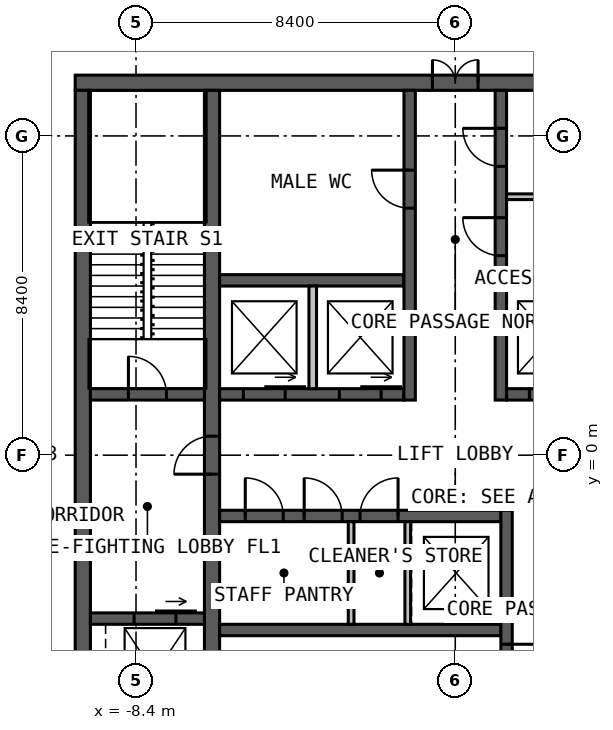
"""IFC4 building model, lengths in metres.
Left out: names, types, materials, properties, quantities, classifications, styles, units other than length and angle.
Written with IfcOpenShell. Run it as: python <this file> out.ifc"""

import sys

from ifc_helpers import new_model, si_unit, direction, frame, frame_2d, origin, place, context, subcontext, project, spatial, rectangle, extrude, element, fill, save


model = new_model("IFC4")
c1 = context("Model", 3, precision=1e-05, world=origin(), true_north=direction((0.0, 1.0)))
c2 = subcontext(c1, "Body", "Model", "MODEL_VIEW")
j1 = project(units=[si_unit("LENGTHUNIT", "METRE"), si_unit("PLANEANGLEUNIT", "RADIAN")], contexts=[c1])
p1 = place(None, origin())
s1 = spatial("IfcSite", under=j1, at=p1, CompositionType="ELEMENT")
p2 = place(p1, origin())
s2 = spatial("IfcBuilding", under=s1, at=p2, CompositionType="ELEMENT")
p3 = place(p2, frame((0.0, 0.0, 236.0)))
s3 = spatial("IfcBuildingStorey", under=s2, at=p3, CompositionType="ELEMENT", Elevation=236.0)
p4 = place(p3, frame((-10.0, 9.8, 0.0), z_axis=(0.0, 0.0, 1.0), x_axis=(1.0, 0.0, 0.0)))
e1 = element("IfcWall", 1, at=p4, inside=s3, PredefinedType="SOLIDWALL", context=c2, shape_type="SweptSolid", body=[
    extrude(rectangle(XDim=20.0, YDim=0.4, at=frame_2d((10.0, 0.0))), origin(), (0.0, 0.0, 1.0), 4.0),
])
p5 = place(p4, frame((9.4, 0.0, 0.0)))
e2 = element("IfcOpeningElement", 2, at=p5, cuts=e1, PredefinedType="OPENING", context=c2, shape_type="SweptSolid", body=[
    extrude(rectangle(XDim=1.2, YDim=2.2, at=frame_2d((0.6, 1.1))), frame((0.0, 0.21, 0.0), z_axis=(0.0, -1.0, 0.0), x_axis=(1.0, 0.0, 0.0)), (0.0, 0.0, 1.0), 0.42),
])
p6 = place(p3, frame((-9.8, 9.6, 0.0), z_axis=(0.0, 0.0, 1.0), x_axis=(0.0, -1.0, 0.0)))
e3 = element("IfcWall", 3, at=p6, inside=s3, PredefinedType="SOLIDWALL", context=c2, shape_type="SweptSolid", body=[
    extrude(rectangle(XDim=19.2, YDim=0.4, at=frame_2d((9.6, 0.0))), origin(), (0.0, 0.0, 1.0), 4.0),
])
p7 = place(p3, frame((-6.4, -9.6, 0.0), z_axis=(0.0, 0.0, 1.0), x_axis=(0.0, 1.0, 0.0)))
e4 = element("IfcWall", 4, at=p7, inside=s3, PredefinedType="SOLIDWALL", context=c2, shape_type="SweptSolid", body=[
    extrude(rectangle(XDim=19.2, YDim=0.4, at=frame_2d((9.6, 0.0))), origin(), (0.0, 0.0, 1.0), 4.0),
])
p8 = place(p7, frame((9.1, 0.0, 0.0)))
e5 = element("IfcOpeningElement", 5, at=p8, cuts=e4, PredefinedType="OPENING", context=c2, shape_type="SweptSolid", body=[
    extrude(rectangle(XDim=1.0, YDim=2.2, at=frame_2d((0.5, 1.1))), frame((0.0, 0.21, 0.0), z_axis=(0.0, -1.0, 0.0), x_axis=(1.0, 0.0, 0.0)), (0.0, 0.0, 1.0), 0.42),
])
p9 = place(p3, frame((-6.2, 1.6, 0.0), z_axis=(0.0, 0.0, 1.0), x_axis=(1.0, 0.0, 0.0)))
e6 = element("IfcWall", 6, at=p9, inside=s3, PredefinedType="SOLIDWALL", context=c2, shape_type="SweptSolid", body=[
    extrude(rectangle(XDim=4.85, YDim=0.3, at=frame_2d((2.425, 0.0))), origin(), (0.0, 0.0, 1.0), 4.0),
])
p10 = place(p9, frame((0.625, 0.0, 0.0)))
e7 = element("IfcOpeningElement", 7, at=p10, cuts=e6, PredefinedType="OPENING", context=c2, shape_type="SweptSolid", body=[
    extrude(rectangle(XDim=1.1, YDim=2.2, at=frame_2d((0.55, 1.1))), frame((0.0, 0.16, 0.0), z_axis=(0.0, -1.0, 0.0), x_axis=(1.0, 0.0, 0.0)), (0.0, 0.0, 1.0), 0.32),
])
p11 = place(p9, frame((3.15, 0.0, 0.0)))
e8 = element("IfcOpeningElement", 8, at=p11, cuts=e6, PredefinedType="OPENING", context=c2, shape_type="SweptSolid", body=[
    extrude(rectangle(XDim=1.1, YDim=2.2, at=frame_2d((0.55, 1.1))), frame((0.0, 0.16, 0.0), z_axis=(0.0, -1.0, 0.0), x_axis=(1.0, 0.0, 0.0)), (0.0, 0.0, 1.0), 0.32),
])
p12 = place(p3, frame((1.35, 1.6, 0.0), z_axis=(0.0, 0.0, 1.0), x_axis=(1.0, 0.0, 0.0)))
e9 = element("IfcWall", 9, at=p12, inside=s3, PredefinedType="SOLIDWALL", context=c2, shape_type="SweptSolid", body=[
    extrude(rectangle(XDim=4.85, YDim=0.3, at=frame_2d((2.425, 0.0))), origin(), (0.0, 0.0, 1.0), 4.0),
])
p13 = place(p12, frame((0.6, 0.0, 0.0)))
e10 = element("IfcOpeningElement", 10, at=p13, cuts=e9, PredefinedType="OPENING", context=c2, shape_type="SweptSolid", body=[
    extrude(rectangle(XDim=1.1, YDim=2.2, at=frame_2d((0.55, 1.1))), frame((0.0, 0.16, 0.0), z_axis=(0.0, -1.0, 0.0), x_axis=(1.0, 0.0, 0.0)), (0.0, 0.0, 1.0), 0.32),
])
p14 = place(p12, frame((3.125, 0.0, 0.0)))
e11 = element("IfcOpeningElement", 11, at=p14, cuts=e9, PredefinedType="OPENING", context=c2, shape_type="SweptSolid", body=[
    extrude(rectangle(XDim=1.1, YDim=2.2, at=frame_2d((0.55, 1.1))), frame((0.0, 0.16, 0.0), z_axis=(0.0, -1.0, 0.0), x_axis=(1.0, 0.0, 0.0)), (0.0, 0.0, 1.0), 0.32),
])
for number, where, z_axis, x_axis in (
    (12, (-6.2, 4.6, 0.0), (0.0, 0.0, 1.0), (1.0, 0.0, 0.0)),
    (13, (1.35, 4.6, 0.0), (0.0, 0.0, 1.0), (1.0, 0.0, 0.0)),
):
    element("IfcWall", number, at=place(p3, frame(where, z_axis=z_axis, x_axis=x_axis)), inside=s3, PredefinedType="SOLIDWALL", context=c2, shape_type="SweptSolid", body=[
        extrude(rectangle(XDim=4.85, YDim=0.3, at=frame_2d((2.425, 0.0))), origin(), (0.0, 0.0, 1.0), 4.0),
    ])
p15 = place(p3, frame((-1.2, 1.45, 0.0), z_axis=(0.0, 0.0, 1.0), x_axis=(0.0, 1.0, 0.0)))
e14 = element("IfcWall", 14, at=p15, inside=s3, PredefinedType="SOLIDWALL", context=c2, shape_type="SweptSolid", body=[
    extrude(rectangle(XDim=8.15, YDim=0.3, at=frame_2d((4.075, 0.0))), origin(), (0.0, 0.0, 1.0), 4.0),
])
p16 = place(p15, frame((5.05, 0.0, 0.0)))
e15 = element("IfcOpeningElement", 15, at=p16, cuts=e14, PredefinedType="OPENING", context=c2, shape_type="SweptSolid", body=[
    extrude(rectangle(XDim=1.0, YDim=2.2, at=frame_2d((0.5, 1.1))), frame((0.0, 0.16, 0.0), z_axis=(0.0, -1.0, 0.0), x_axis=(1.0, 0.0, 0.0)), (0.0, 0.0, 1.0), 0.32),
])
p17 = place(p3, frame((1.2, 1.45, 0.0), z_axis=(0.0, 0.0, 1.0), x_axis=(0.0, 1.0, 0.0)))
e16 = element("IfcWall", 16, at=p17, inside=s3, PredefinedType="SOLIDWALL", context=c2, shape_type="SweptSolid", body=[
    extrude(rectangle(XDim=8.15, YDim=0.3, at=frame_2d((4.075, 0.0))), origin(), (0.0, 0.0, 1.0), 4.0),
])
p18 = place(p17, frame((3.8, 0.0, 0.0)))
e17 = element("IfcOpeningElement", 17, at=p18, cuts=e16, PredefinedType="OPENING", context=c2, shape_type="SweptSolid", body=[
    extrude(rectangle(XDim=1.0, YDim=2.2, at=frame_2d((0.5, 1.1))), frame((0.0, 0.16, 0.0), z_axis=(0.0, -1.0, 0.0), x_axis=(1.0, 0.0, 0.0)), (0.0, 0.0, 1.0), 0.32),
])
p19 = place(p17, frame((6.15, 0.0, 0.0)))
e18 = element("IfcOpeningElement", 18, at=p19, cuts=e16, PredefinedType="OPENING", context=c2, shape_type="SweptSolid", body=[
    extrude(rectangle(XDim=1.0, YDim=2.2, at=frame_2d((0.5, 1.1))), frame((0.0, 0.16, 0.0), z_axis=(0.0, -1.0, 0.0), x_axis=(1.0, 0.0, 0.0)), (0.0, 0.0, 1.0), 0.32),
])
p20 = place(p3, frame((-6.2, -1.6, 0.0), z_axis=(0.0, 0.0, 1.0), x_axis=(1.0, 0.0, 0.0)))
e19 = element("IfcWall", 19, at=p20, inside=s3, PredefinedType="SOLIDWALL", context=c2, shape_type="SweptSolid", body=[
    extrude(rectangle(XDim=7.4, YDim=0.3, at=frame_2d((3.7, 0.0))), origin(), (0.0, 0.0, 1.0), 4.0),
])
p21 = place(p20, frame((0.675, 0.0, 0.0)))
e20 = element("IfcOpeningElement", 20, at=p21, cuts=e19, PredefinedType="OPENING", context=c2, shape_type="SweptSolid", body=[
    extrude(rectangle(XDim=1.0, YDim=2.2, at=frame_2d((0.5, 1.1))), frame((0.0, 0.16, 0.0), z_axis=(0.0, -1.0, 0.0), x_axis=(1.0, 0.0, 0.0)), (0.0, 0.0, 1.0), 0.32),
])
p22 = place(p20, frame((2.225, 0.0, 0.0)))
e21 = element("IfcOpeningElement", 21, at=p22, cuts=e19, PredefinedType="OPENING", context=c2, shape_type="SweptSolid", body=[
    extrude(rectangle(XDim=1.0, YDim=2.2, at=frame_2d((0.5, 1.1))), frame((0.0, 0.16, 0.0), z_axis=(0.0, -1.0, 0.0), x_axis=(1.0, 0.0, 0.0)), (0.0, 0.0, 1.0), 0.32),
])
p23 = place(p20, frame((3.695, 0.0, 0.0)))
e22 = element("IfcOpeningElement", 22, at=p23, cuts=e19, PredefinedType="OPENING", context=c2, shape_type="SweptSolid", body=[
    extrude(rectangle(XDim=1.0, YDim=2.2, at=frame_2d((0.5, 1.1))), frame((0.0, 0.16, 0.0), z_axis=(0.0, -1.0, 0.0), x_axis=(1.0, 0.0, 0.0)), (0.0, 0.0, 1.0), 0.32),
])
p24 = place(p3, frame((-6.2, -4.6, 0.0), z_axis=(0.0, 0.0, 1.0), x_axis=(1.0, 0.0, 0.0)))
e23 = element("IfcWall", 23, at=p24, inside=s3, PredefinedType="SOLIDWALL", context=c2, shape_type="SweptSolid", body=[
    extrude(rectangle(XDim=7.4, YDim=0.3, at=frame_2d((3.7, 0.0))), origin(), (0.0, 0.0, 1.0), 4.0),
])
p25 = place(p3, frame((1.35, -1.45, 0.0), z_axis=(0.0, 0.0, 1.0), x_axis=(0.0, -1.0, 0.0)))
e24 = element("IfcWall", 24, at=p25, inside=s3, PredefinedType="SOLIDWALL", context=c2, shape_type="SweptSolid", body=[
    extrude(rectangle(XDim=8.15, YDim=0.3, at=frame_2d((4.075, 0.0))), origin(), (0.0, 0.0, 1.0), 4.0),
])
p26 = place(p25, frame((6.0, 0.0, 0.0)))
e25 = element("IfcOpeningElement", 25, at=p26, cuts=e24, PredefinedType="OPENING", context=c2, shape_type="SweptSolid", body=[
    extrude(rectangle(XDim=1.0, YDim=2.2, at=frame_2d((0.5, 1.1))), frame((0.0, 0.16, 0.0), z_axis=(0.0, -1.0, 0.0), x_axis=(1.0, 0.0, 0.0)), (0.0, 0.0, 1.0), 0.32),
])
p27 = place(p25, frame((3.525, 0.0, 0.0)))
e26 = element("IfcOpeningElement", 26, at=p27, cuts=e24, PredefinedType="OPENING", context=c2, shape_type="SweptSolid", body=[
    extrude(rectangle(XDim=0.9, YDim=2.2, at=frame_2d((0.45, 1.1))), frame((0.0, 0.16, 0.0), z_axis=(0.0, -1.0, 0.0), x_axis=(1.0, 0.0, 0.0)), (0.0, 0.0, 1.0), 0.32),
])
p28 = place(p3, frame((-9.6, 1.6, 0.0), z_axis=(0.0, 0.0, 1.0), x_axis=(1.0, 0.0, 0.0)))
e27 = element("IfcWall", 27, at=p28, inside=s3, PredefinedType="SOLIDWALL", context=c2, shape_type="SweptSolid", body=[
    extrude(rectangle(XDim=3.0, YDim=0.3, at=frame_2d((1.5, 0.0))), origin(), (0.0, 0.0, 1.0), 4.0),
])
p29 = place(p28, frame((1.0, 0.0, 0.0)))
e28 = element("IfcOpeningElement", 28, at=p29, cuts=e27, PredefinedType="OPENING", context=c2, shape_type="SweptSolid", body=[
    extrude(rectangle(XDim=1.0, YDim=2.2, at=frame_2d((0.5, 1.1))), frame((0.0, 0.16, 0.0), z_axis=(0.0, -1.0, 0.0), x_axis=(1.0, 0.0, 0.0)), (0.0, 0.0, 1.0), 0.32),
])
p30 = place(p3, frame((-9.6, -4.3, 0.0), z_axis=(0.0, 0.0, 1.0), x_axis=(1.0, 0.0, 0.0)))
e29 = element("IfcWall", 29, at=p30, inside=s3, PredefinedType="SOLIDWALL", context=c2, shape_type="SweptSolid", body=[
    extrude(rectangle(XDim=3.0, YDim=0.3, at=frame_2d((1.5, 0.0))), origin(), (0.0, 0.0, 1.0), 4.0),
])
p31 = place(p30, frame((1.15, 0.0, 0.0)))
e30 = element("IfcOpeningElement", 30, at=p31, cuts=e29, PredefinedType="OPENING", context=c2, shape_type="SweptSolid", body=[
    extrude(rectangle(XDim=1.1, YDim=2.2, at=frame_2d((0.55, 1.1))), frame((0.0, 0.16, 0.0), z_axis=(0.0, -1.0, 0.0), x_axis=(1.0, 0.0, 0.0)), (0.0, 0.0, 1.0), 0.32),
])
p32 = place(p3, frame((-3.75, 1.75, 0.0), z_axis=(0.0, 0.0, 1.0), x_axis=(0.0, 1.0, 0.0)))
e31 = element("IfcWall", 31, at=p32, inside=s3, PredefinedType="SOLIDWALL", context=c2, shape_type="SweptSolid", body=[
    extrude(rectangle(XDim=2.7, YDim=0.2, at=frame_2d((1.35, 0.0))), origin(), (0.0, 0.0, 1.0), 3.75),
])
p33 = place(p3, frame((1.35, 6.8, 0.0), z_axis=(0.0, 0.0, 1.0), x_axis=(1.0, 0.0, 0.0)))
e32 = element("IfcWall", 32, at=p33, inside=s3, PredefinedType="PARTITIONING", context=c2, shape_type="SweptSolid", body=[
    extrude(rectangle(XDim=4.85, YDim=0.15, at=frame_2d((2.425, 0.0))), origin(), (0.0, 0.0, 1.0), 3.75),
])
p34 = place(p33, frame((3.15, 0.0, 0.0)))
e33 = element("IfcOpeningElement", 33, at=p34, cuts=e32, PredefinedType="OPENING", context=c2, shape_type="SweptSolid", body=[
    extrude(rectangle(XDim=0.9, YDim=2.2, at=frame_2d((0.45, 1.1))), frame((0.0, 0.085, 0.0), z_axis=(0.0, -1.0, 0.0), x_axis=(1.0, 0.0, 0.0)), (0.0, 0.0, 1.0), 0.17),
])
for number, where, z_axis, x_axis in (
    (34, (-2.74, -1.75, 0.0), (0.0, 0.0, 1.0), (0.0, -1.0, 0.0)),
    (35, (-1.25, -1.75, 0.0), (0.0, 0.0, 1.0), (0.0, -1.0, 0.0)),
):
    element("IfcWall", number, at=place(p3, frame(where, z_axis=z_axis, x_axis=x_axis)), inside=s3, PredefinedType="PARTITIONING", context=c2, shape_type="SweptSolid", body=[
        extrude(rectangle(XDim=2.7, YDim=0.15, at=frame_2d((1.35, 0.0))), origin(), (0.0, 0.0, 1.0), 3.75),
    ])
p35 = place(p5, origin())
e36 = element("IfcDoor", 36, at=p35, inside=s3, OperationType="DOUBLE_DOOR_SINGLE_SWING", PredefinedType="DOOR", context=c2, shape_type="SweptSolid", body=[
    extrude(rectangle(XDim=1.2, YDim=2.2, at=frame_2d((0.6, 1.1))), frame((0.0, 0.025, 0.0), z_axis=(0.0, -1.0, 0.0), x_axis=(1.0, 0.0, 0.0)), (0.0, 0.0, 1.0), 0.05),
])
fill(e2, e36)
p36 = place(p8, origin())
e37 = element("IfcDoor", 37, at=p36, inside=s3, OperationType="SINGLE_SWING_LEFT", PredefinedType="DOOR", context=c2, shape_type="SweptSolid", body=[
    extrude(rectangle(XDim=1.0, YDim=2.2, at=frame_2d((0.5, 1.1))), frame((0.0, 0.025, 0.0), z_axis=(0.0, -1.0, 0.0), x_axis=(1.0, 0.0, 0.0)), (0.0, 0.0, 1.0), 0.05),
])
fill(e5, e37)
p37 = place(p29, origin())
e38 = element("IfcDoor", 38, at=p37, inside=s3, OperationType="SINGLE_SWING_LEFT", PredefinedType="DOOR", context=c2, shape_type="SweptSolid", body=[
    extrude(rectangle(XDim=1.0, YDim=2.2, at=frame_2d((0.5, 1.1))), frame((0.0, 0.025, 0.0), z_axis=(0.0, -1.0, 0.0), x_axis=(1.0, 0.0, 0.0)), (0.0, 0.0, 1.0), 0.05),
])
fill(e28, e38)
p38 = place(p16, origin())
e39 = element("IfcDoor", 39, at=p38, inside=s3, OperationType="SINGLE_SWING_RIGHT", PredefinedType="DOOR", context=c2, shape_type="SweptSolid", body=[
    extrude(rectangle(XDim=1.0, YDim=2.2, at=frame_2d((0.5, 1.1))), frame((0.0, 0.025, 0.0), z_axis=(0.0, -1.0, 0.0), x_axis=(1.0, 0.0, 0.0)), (0.0, 0.0, 1.0), 0.05),
])
fill(e15, e39)
p39 = place(p18, origin())
e40 = element("IfcDoor", 40, at=p39, inside=s3, OperationType="SINGLE_SWING_RIGHT", PredefinedType="DOOR", context=c2, shape_type="SweptSolid", body=[
    extrude(rectangle(XDim=1.0, YDim=2.2, at=frame_2d((0.5, 1.1))), frame((0.0, 0.025, 0.0), z_axis=(0.0, -1.0, 0.0), x_axis=(1.0, 0.0, 0.0)), (0.0, 0.0, 1.0), 0.05),
])
fill(e17, e40)
p40 = place(p19, origin())
e41 = element("IfcDoor", 41, at=p40, inside=s3, OperationType="SINGLE_SWING_RIGHT", PredefinedType="DOOR", context=c2, shape_type="SweptSolid", body=[
    extrude(rectangle(XDim=1.0, YDim=2.2, at=frame_2d((0.5, 1.1))), frame((0.0, 0.025, 0.0), z_axis=(0.0, -1.0, 0.0), x_axis=(1.0, 0.0, 0.0)), (0.0, 0.0, 1.0), 0.05),
])
fill(e18, e41)
p41 = place(p27, origin())
e42 = element("IfcDoor", 42, at=p41, inside=s3, OperationType="SINGLE_SWING_LEFT", PredefinedType="DOOR", context=c2, shape_type="SweptSolid", body=[
    extrude(rectangle(XDim=0.9, YDim=2.2, at=frame_2d((0.45, 1.1))), frame((0.0, 0.025, 0.0), z_axis=(0.0, -1.0, 0.0), x_axis=(1.0, 0.0, 0.0)), (0.0, 0.0, 1.0), 0.05),
])
fill(e26, e42)
p42 = place(p21, origin())
e43 = element("IfcDoor", 43, at=p42, inside=s3, OperationType="SINGLE_SWING_LEFT", PredefinedType="DOOR", context=c2, shape_type="SweptSolid", body=[
    extrude(rectangle(XDim=1.0, YDim=2.2, at=frame_2d((0.5, 1.1))), frame((0.0, 0.025, 0.0), z_axis=(0.0, -1.0, 0.0), x_axis=(1.0, 0.0, 0.0)), (0.0, 0.0, 1.0), 0.05),
])
fill(e20, e43)
p43 = place(p22, origin())
e44 = element("IfcDoor", 44, at=p43, inside=s3, OperationType="SINGLE_SWING_LEFT", PredefinedType="DOOR", context=c2, shape_type="SweptSolid", body=[
    extrude(rectangle(XDim=1.0, YDim=2.2, at=frame_2d((0.5, 1.1))), frame((0.0, 0.025, 0.0), z_axis=(0.0, -1.0, 0.0), x_axis=(1.0, 0.0, 0.0)), (0.0, 0.0, 1.0), 0.05),
])
fill(e21, e44)
p44 = place(p23, origin())
e45 = element("IfcDoor", 45, at=p44, inside=s3, OperationType="SINGLE_SWING_RIGHT", PredefinedType="DOOR", context=c2, shape_type="SweptSolid", body=[
    extrude(rectangle(XDim=1.0, YDim=2.2, at=frame_2d((0.5, 1.1))), frame((0.0, 0.025, 0.0), z_axis=(0.0, -1.0, 0.0), x_axis=(1.0, 0.0, 0.0)), (0.0, 0.0, 1.0), 0.05),
])
fill(e22, e45)
p45 = place(p10, origin())
e46 = element("IfcDoor", 46, at=p45, inside=s3, OperationType="SLIDING_TO_LEFT", PredefinedType="DOOR", context=c2, shape_type="SweptSolid", body=[
    extrude(rectangle(XDim=1.1, YDim=2.2, at=frame_2d((0.55, 1.1))), frame((0.0, 0.025, 0.0), z_axis=(0.0, -1.0, 0.0), x_axis=(1.0, 0.0, 0.0)), (0.0, 0.0, 1.0), 0.05),
])
fill(e7, e46)
p46 = place(p11, origin())
e47 = element("IfcDoor", 47, at=p46, inside=s3, OperationType="SLIDING_TO_LEFT", PredefinedType="DOOR", context=c2, shape_type="SweptSolid", body=[
    extrude(rectangle(XDim=1.1, YDim=2.2, at=frame_2d((0.55, 1.1))), frame((0.0, 0.025, 0.0), z_axis=(0.0, -1.0, 0.0), x_axis=(1.0, 0.0, 0.0)), (0.0, 0.0, 1.0), 0.05),
])
fill(e8, e47)
p47 = place(p13, origin())
e48 = element("IfcDoor", 48, at=p47, inside=s3, OperationType="SLIDING_TO_LEFT", PredefinedType="DOOR", context=c2, shape_type="SweptSolid", body=[
    extrude(rectangle(XDim=1.1, YDim=2.2, at=frame_2d((0.55, 1.1))), frame((0.0, 0.025, 0.0), z_axis=(0.0, -1.0, 0.0), x_axis=(1.0, 0.0, 0.0)), (0.0, 0.0, 1.0), 0.05),
])
fill(e10, e48)
p48 = place(p31, origin())
e49 = element("IfcDoor", 49, at=p48, inside=s3, OperationType="SLIDING_TO_LEFT", PredefinedType="DOOR", context=c2, shape_type="SweptSolid", body=[
    extrude(rectangle(XDim=1.1, YDim=2.2, at=frame_2d((0.55, 1.1))), frame((0.0, 0.025, 0.0), z_axis=(0.0, -1.0, 0.0), x_axis=(1.0, 0.0, 0.0)), (0.0, 0.0, 1.0), 0.05),
])
fill(e30, e49)
save(model, sys.argv[1])
